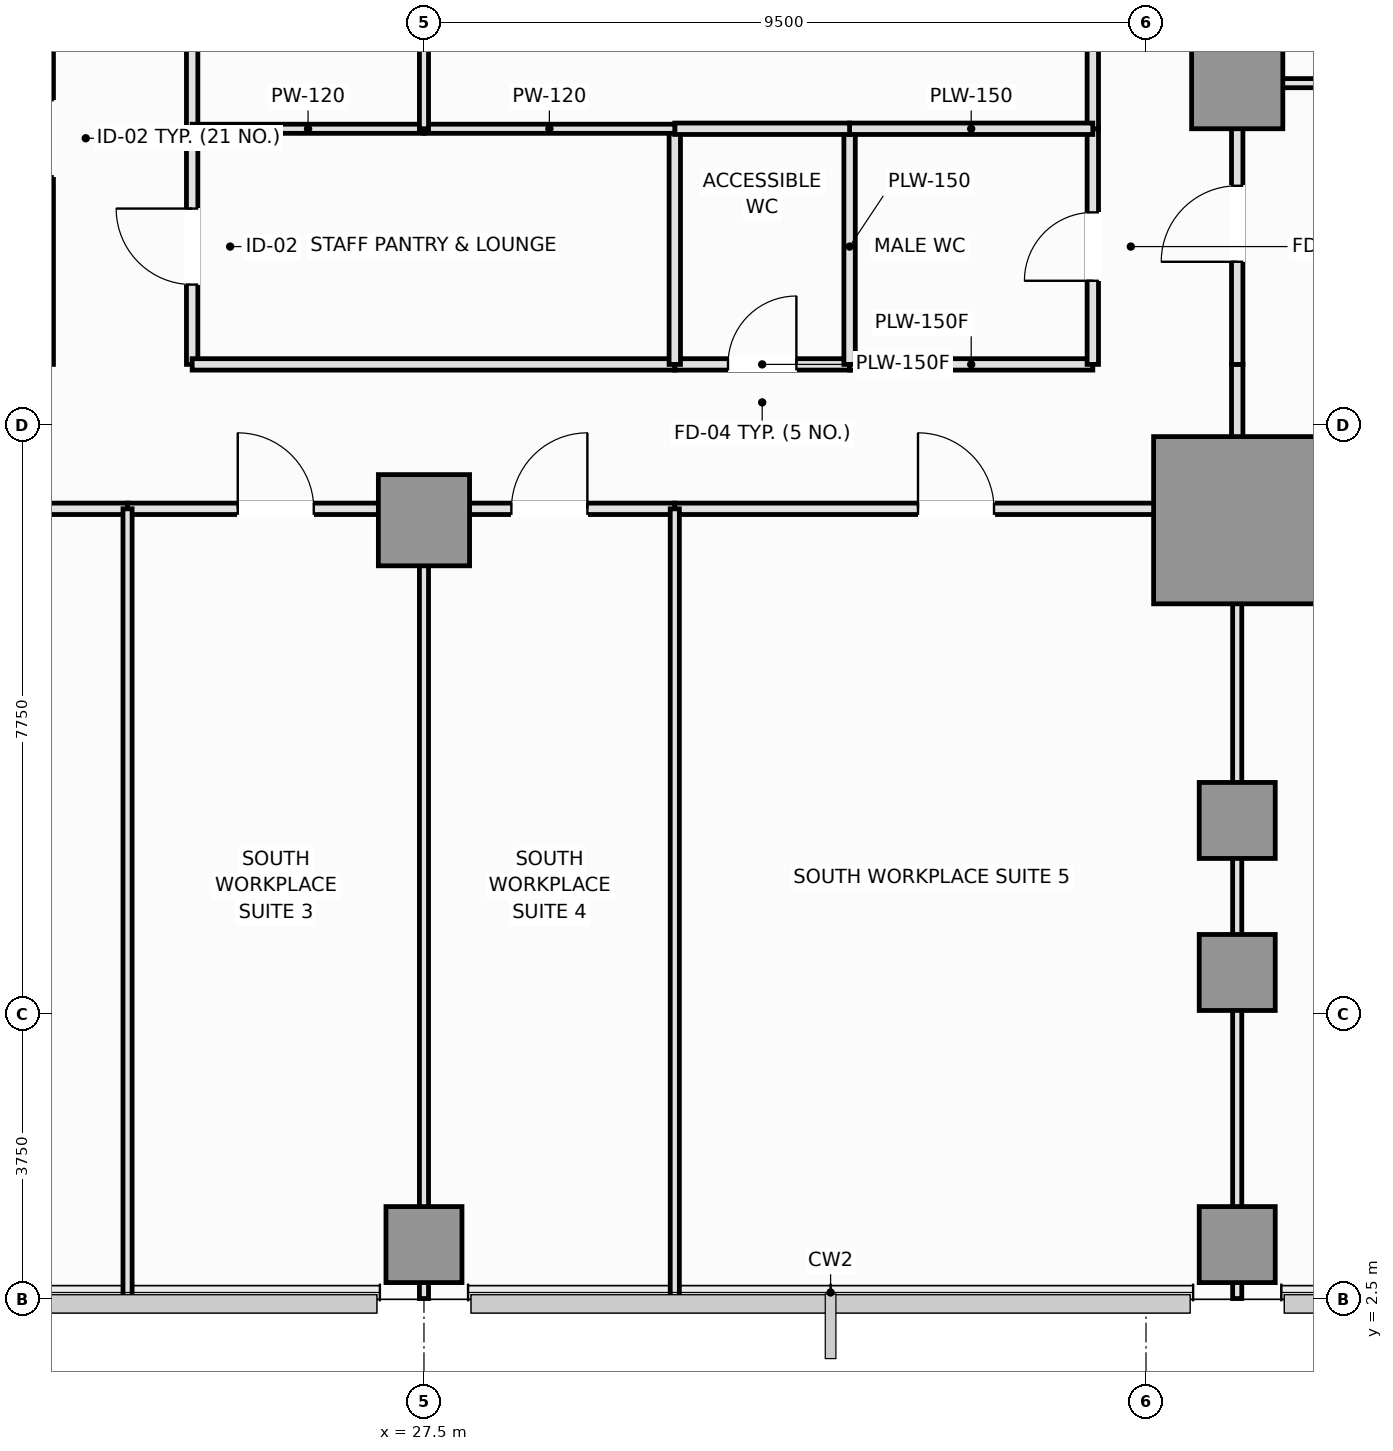
"""IFC4 building model, lengths in metres.
Left out: names, types, materials, properties, quantities, classifications, styles, units other than length and angle.
Written with IfcOpenShell. Run it as: python <this file> out.ifc"""

import sys

from ifc_helpers import new_model, si_unit, direction, frame, frame_2d, origin, origin_2d, place, context, subcontext, project, spatial, rectangle, extrude, element, fill, save


model = new_model("IFC4")
c1 = context("Model", 3, precision=1e-05, world=origin(), true_north=direction((0.0, 1.0)))
c2 = subcontext(c1, "Body", "Model", "MODEL_VIEW")
j1 = project(units=[si_unit("LENGTHUNIT", "METRE"), si_unit("PLANEANGLEUNIT", "RADIAN")], contexts=[c1])
p1 = place(None, origin())
s1 = spatial("IfcSite", under=j1, at=p1, CompositionType="ELEMENT")
p2 = place(p1, origin())
s2 = spatial("IfcBuilding", under=s1, at=p2, CompositionType="ELEMENT")
p3 = place(p2, frame((0.0, 0.0, 82.4)))
s3 = spatial("IfcBuildingStorey", under=s2, at=p3, CompositionType="ELEMENT", Elevation=82.4)
p4 = place(p3, frame((38.2, 12.75, 0.0), z_axis=(0.0, 0.0, 1.0), x_axis=(1.0, 0.0, 0.0)))
e1 = element("IfcColumn", 1, at=p4, inside=s3, PredefinedType="COLUMN", context=c2, shape_type="SweptSolid", body=[
    extrude(rectangle(XDim=2.2, YDim=2.2, at=origin_2d()), origin(), (0.0, 0.0, 1.0), 3.55),
])
for number, where, z_axis, x_axis in (
    (2, (27.5, 12.75, 0.0), (0.0, 0.0, 1.0), (1.0, 0.0, 0.0)),
    (3, (38.2, 18.5, 0.0), (0.0, 0.0, 1.0), (1.0, 0.0, 0.0)),
):
    element("IfcColumn", number, at=place(p3, frame(where, z_axis=z_axis, x_axis=x_axis)), inside=s3, PredefinedType="COLUMN", context=c2, shape_type="SweptSolid", body=[
        extrude(rectangle(XDim=1.2, YDim=1.2, at=origin_2d()), origin(), (0.0, 0.0, 1.0), 3.55),
    ])
for number, where, z_axis, x_axis in (
    (4, (38.2, 6.8, 0.0), (0.0, 0.0, 1.0), (1.0, 0.0, 0.0)),
    (5, (38.2, 8.8, 0.0), (0.0, 0.0, 1.0), (1.0, 0.0, 0.0)),
    (6, (27.5, 3.22, 0.0), (0.0, 0.0, 1.0), (1.0, 0.0, 0.0)),
    (7, (38.2, 3.22, 0.0), (0.0, 0.0, 1.0), (1.0, 0.0, 0.0)),
):
    element("IfcColumn", number, at=place(p3, frame(where, z_axis=z_axis, x_axis=x_axis)), inside=s3, PredefinedType="COLUMN", context=c2, shape_type="SweptSolid", body=[
        extrude(rectangle(XDim=1.0, YDim=1.0, at=origin_2d()), origin(), (0.0, 0.0, 1.0), 3.55),
    ])
p5 = place(p3, frame((22.55, 14.8, 0.0), z_axis=(0.0, 0.0, 1.0), x_axis=(0.0, 1.0, 0.0)))
e8 = element("IfcWall", 8, at=p5, inside=s3, PredefinedType="PARTITIONING", context=c2, shape_type="SweptSolid", body=[
    extrude(rectangle(XDim=5.95, YDim=0.15, at=frame_2d((2.975, 0.0))), origin(), (0.0, 0.0, 1.0), 3.01),
])
p6 = place(p5, frame((2.475, 0.0, 0.0)))
e9 = element("IfcOpeningElement", 9, at=p6, cuts=e8, PredefinedType="OPENING", context=c2, shape_type="SweptSolid", body=[
    extrude(rectangle(XDim=1.0, YDim=2.15, at=frame_2d((0.5, 1.075))), frame((0.0, 0.085, 0.0), z_axis=(0.0, -1.0, 0.0), x_axis=(1.0, 0.0, 0.0)), (0.0, 0.0, 1.0), 0.17),
])
p7 = place(p3, frame((24.45, 14.8, 0.0), z_axis=(0.0, 0.0, 1.0), x_axis=(0.0, 1.0, 0.0)))
e10 = element("IfcWall", 10, at=p7, inside=s3, PredefinedType="PARTITIONING", context=c2, shape_type="SweptSolid", body=[
    extrude(rectangle(XDim=3.1, YDim=0.15, at=frame_2d((1.55, 0.0))), origin(), (0.0, 0.0, 1.0), 3.37),
])
p8 = place(p7, frame((1.05, 0.0, 0.0)))
e11 = element("IfcOpeningElement", 11, at=p8, cuts=e10, PredefinedType="OPENING", context=c2, shape_type="SweptSolid", body=[
    extrude(rectangle(XDim=1.0, YDim=2.15, at=frame_2d((0.5, 1.075))), frame((0.0, 0.085, 0.0), z_axis=(0.0, -1.0, 0.0), x_axis=(1.0, 0.0, 0.0)), (0.0, 0.0, 1.0), 0.17),
])
p9 = place(p3, frame((24.45, 17.9, 0.0), z_axis=(0.0, 0.0, 1.0), x_axis=(0.0, 1.0, 0.0)))
e12 = element("IfcWall", 12, at=p9, inside=s3, PredefinedType="PARTITIONING", context=c2, shape_type="SweptSolid", body=[
    extrude(rectangle(XDim=7.35, YDim=0.15, at=frame_2d((3.675, 0.0))), origin(), (0.0, 0.0, 1.0), 3.37),
])
p10 = place(p9, frame((3.175, 0.0, 0.0)))
e13 = element("IfcOpeningElement", 13, at=p10, cuts=e12, PredefinedType="OPENING", context=c2, shape_type="SweptSolid", body=[
    extrude(rectangle(XDim=1.0, YDim=2.15, at=frame_2d((0.5, 1.075))), frame((0.0, 0.085, 0.0), z_axis=(0.0, -1.0, 0.0), x_axis=(1.0, 0.0, 0.0)), (0.0, 0.0, 1.0), 0.17),
])
p11 = place(p3, frame((33.1, 14.8, 0.0), z_axis=(0.0, 0.0, 1.0), x_axis=(1.0, 0.0, 0.0)))
e14 = element("IfcWall", 14, at=p11, inside=s3, PredefinedType="PLUMBINGWALL", context=c2, shape_type="SweptSolid", body=[
    extrude(rectangle(XDim=3.2, YDim=0.15, at=frame_2d((1.6, 0.0))), origin(), (0.0, 0.0, 1.0), 3.37),
])
p12 = place(p3, frame((30.8, 14.8, 0.0), z_axis=(0.0, 0.0, 1.0), x_axis=(1.0, 0.0, 0.0)))
e15 = element("IfcWall", 15, at=p12, inside=s3, PredefinedType="PLUMBINGWALL", context=c2, shape_type="SweptSolid", body=[
    extrude(rectangle(XDim=2.3, YDim=0.15, at=frame_2d((1.15, 0.0))), origin(), (0.0, 0.0, 1.0), 3.37),
])
p13 = place(p12, frame((0.7, 0.0, 0.0)))
e16 = element("IfcOpeningElement", 16, at=p13, cuts=e15, PredefinedType="OPENING", context=c2, shape_type="SweptSolid", body=[
    extrude(rectangle(XDim=0.9, YDim=2.1, at=frame_2d((0.45, 1.05))), frame((0.0, 0.085, 0.0), z_axis=(0.0, -1.0, 0.0), x_axis=(1.0, 0.0, 0.0)), (0.0, 0.0, 1.0), 0.17),
])
p14 = place(p3, frame((24.45, 14.8, 0.0), z_axis=(0.0, 0.0, 1.0), x_axis=(1.0, 0.0, 0.0)))
e17 = element("IfcWall", 17, at=p14, inside=s3, PredefinedType="PARTITIONING", context=c2, shape_type="SweptSolid", body=[
    extrude(rectangle(XDim=6.35, YDim=0.15, at=frame_2d((3.175, 0.0))), origin(), (0.0, 0.0, 1.0), 3.37),
])
p15 = place(p3, frame((19.9, 12.9, 0.0), z_axis=(0.0, 0.0, 1.0), x_axis=(1.0, 0.0, 0.0)))
e18 = element("IfcWall", 18, at=p15, inside=s3, PredefinedType="PARTITIONING", context=c2, shape_type="SweptSolid", body=[
    extrude(rectangle(XDim=3.7, YDim=0.15, at=frame_2d((1.85, 0.0))), origin(), (0.0, 0.0, 1.0), 2.72),
])
p16 = place(p15, frame((1.35, 0.0, 0.0)))
e19 = element("IfcOpeningElement", 19, at=p16, cuts=e18, PredefinedType="OPENING", context=c2, shape_type="SweptSolid", body=[
    extrude(rectangle(XDim=1.0, YDim=2.15, at=frame_2d((0.5, 1.075))), frame((0.0, 0.085, 0.0), z_axis=(0.0, -1.0, 0.0), x_axis=(1.0, 0.0, 0.0)), (0.0, 0.0, 1.0), 0.17),
])
p17 = place(p3, frame((23.6, 12.9, 0.0), z_axis=(0.0, 0.0, 1.0), x_axis=(1.0, 0.0, 0.0)))
e20 = element("IfcWall", 20, at=p17, inside=s3, PredefinedType="PARTITIONING", context=c2, shape_type="SweptSolid", body=[
    extrude(rectangle(XDim=3.9, YDim=0.15, at=frame_2d((1.95, 0.0))), origin(), (0.0, 0.0, 1.0), 2.72),
])
p18 = place(p17, frame((1.45, 0.0, 0.0)))
e21 = element("IfcOpeningElement", 21, at=p18, cuts=e20, PredefinedType="OPENING", context=c2, shape_type="SweptSolid", body=[
    extrude(rectangle(XDim=1.0, YDim=2.15, at=frame_2d((0.5, 1.075))), frame((0.0, 0.085, 0.0), z_axis=(0.0, -1.0, 0.0), x_axis=(1.0, 0.0, 0.0)), (0.0, 0.0, 1.0), 0.17),
])
p19 = place(p3, frame((27.5, 12.9, 0.0), z_axis=(0.0, 0.0, 1.0), x_axis=(1.0, 0.0, 0.0)))
e22 = element("IfcWall", 22, at=p19, inside=s3, PredefinedType="PARTITIONING", context=c2, shape_type="SweptSolid", body=[
    extrude(rectangle(XDim=3.3, YDim=0.15, at=frame_2d((1.65, 0.0))), origin(), (0.0, 0.0, 1.0), 2.72),
])
p20 = place(p19, frame((1.15, 0.0, 0.0)))
e23 = element("IfcOpeningElement", 23, at=p20, cuts=e22, PredefinedType="OPENING", context=c2, shape_type="SweptSolid", body=[
    extrude(rectangle(XDim=1.0, YDim=2.15, at=frame_2d((0.5, 1.075))), frame((0.0, 0.085, 0.0), z_axis=(0.0, -1.0, 0.0), x_axis=(1.0, 0.0, 0.0)), (0.0, 0.0, 1.0), 0.17),
])
p21 = place(p3, frame((30.8, 12.9, 0.0), z_axis=(0.0, 0.0, 1.0), x_axis=(1.0, 0.0, 0.0)))
e24 = element("IfcWall", 24, at=p21, inside=s3, PredefinedType="PARTITIONING", context=c2, shape_type="SweptSolid", body=[
    extrude(rectangle(XDim=7.4, YDim=0.15, at=frame_2d((3.7, 0.0))), origin(), (0.0, 0.0, 1.0), 2.72),
])
p22 = place(p21, frame((3.2, 0.0, 0.0)))
e25 = element("IfcOpeningElement", 25, at=p22, cuts=e24, PredefinedType="OPENING", context=c2, shape_type="SweptSolid", body=[
    extrude(rectangle(XDim=1.0, YDim=2.15, at=frame_2d((0.5, 1.075))), frame((0.0, 0.085, 0.0), z_axis=(0.0, -1.0, 0.0), x_axis=(1.0, 0.0, 0.0)), (0.0, 0.0, 1.0), 0.17),
])
p23 = place(p3, frame((38.2, 12.9, 0.0), z_axis=(0.0, 0.0, 1.0), x_axis=(0.0, 1.0, 0.0)))
e26 = element("IfcWall", 26, at=p23, inside=s3, PredefinedType="PARTITIONING", context=c2, shape_type="SweptSolid", body=[
    extrude(rectangle(XDim=1.9, YDim=0.15, at=frame_2d((0.95, 0.0))), origin(), (0.0, 0.0, 1.0), 2.82),
])
p24 = place(p3, frame((36.3, 14.8, 0.0), z_axis=(0.0, 0.0, 1.0), x_axis=(0.0, 1.0, 0.0)))
e27 = element("IfcWall", 27, at=p24, inside=s3, PredefinedType="PLUMBINGWALL", context=c2, shape_type="SweptSolid", body=[
    extrude(rectangle(XDim=3.1, YDim=0.15, at=frame_2d((1.55, 0.0))), origin(), (0.0, 0.0, 1.0), 3.37),
])
p25 = place(p24, frame((1.1, 0.0, 0.0)))
e28 = element("IfcOpeningElement", 28, at=p25, cuts=e27, PredefinedType="OPENING", context=c2, shape_type="SweptSolid", body=[
    extrude(rectangle(XDim=0.9, YDim=2.1, at=frame_2d((0.45, 1.05))), frame((0.0, 0.085, 0.0), z_axis=(0.0, -1.0, 0.0), x_axis=(1.0, 0.0, 0.0)), (0.0, 0.0, 1.0), 0.17),
])
p26 = place(p3, frame((36.3, 17.9, 0.0), z_axis=(0.0, 0.0, 1.0), x_axis=(0.0, 1.0, 0.0)))
e29 = element("IfcWall", 29, at=p26, inside=s3, PredefinedType="PARTITIONING", context=c2, shape_type="SweptSolid", body=[
    extrude(rectangle(XDim=7.35, YDim=0.15, at=frame_2d((3.675, 0.0))), origin(), (0.0, 0.0, 1.0), 3.37),
])
p27 = place(p26, frame((3.175, 0.0, 0.0)))
e30 = element("IfcOpeningElement", 30, at=p27, cuts=e29, PredefinedType="OPENING", context=c2, shape_type="SweptSolid", body=[
    extrude(rectangle(XDim=1.0, YDim=2.15, at=frame_2d((0.5, 1.075))), frame((0.0, 0.085, 0.0), z_axis=(0.0, -1.0, 0.0), x_axis=(1.0, 0.0, 0.0)), (0.0, 0.0, 1.0), 0.17),
])
p28 = place(p3, frame((38.2, 14.8, 0.0), z_axis=(0.0, 0.0, 1.0), x_axis=(0.0, 1.0, 0.0)))
e31 = element("IfcWall", 31, at=p28, inside=s3, PredefinedType="PARTITIONING", context=c2, shape_type="SweptSolid", body=[
    extrude(rectangle(XDim=3.7, YDim=0.15, at=frame_2d((1.85, 0.0))), origin(), (0.0, 0.0, 1.0), 2.82),
])
p29 = place(p28, frame((1.35, 0.0, 0.0)))
e32 = element("IfcOpeningElement", 32, at=p29, cuts=e31, PredefinedType="OPENING", context=c2, shape_type="SweptSolid", body=[
    extrude(rectangle(XDim=1.0, YDim=2.15, at=frame_2d((0.5, 1.075))), frame((0.0, 0.085, 0.0), z_axis=(0.0, -1.0, 0.0), x_axis=(1.0, 0.0, 0.0)), (0.0, 0.0, 1.0), 0.17),
])
p30 = place(p3, frame((38.2, 18.5, 0.0), z_axis=(0.0, 0.0, 1.0), x_axis=(0.0, 1.0, 0.0)))
e33 = element("IfcWall", 33, at=p30, inside=s3, PredefinedType="PARTITIONING", context=c2, shape_type="SweptSolid", body=[
    extrude(rectangle(XDim=4.5, YDim=0.15, at=frame_2d((2.25, 0.0))), origin(), (0.0, 0.0, 1.0), 2.82),
])
p31 = place(p30, frame((1.75, 0.0, 0.0)))
e34 = element("IfcOpeningElement", 34, at=p31, cuts=e33, PredefinedType="OPENING", context=c2, shape_type="SweptSolid", body=[
    extrude(rectangle(XDim=1.0, YDim=2.15, at=frame_2d((0.5, 1.075))), frame((0.0, 0.085, 0.0), z_axis=(0.0, -1.0, 0.0), x_axis=(1.0, 0.0, 0.0)), (0.0, 0.0, 1.0), 0.17),
])
p32 = place(p3, frame((33.1, 14.8, 0.0), z_axis=(0.0, 0.0, 1.0), x_axis=(0.0, 1.0, 0.0)))
e35 = element("IfcWall", 35, at=p32, inside=s3, PredefinedType="PLUMBINGWALL", context=c2, shape_type="SweptSolid", body=[
    extrude(rectangle(XDim=3.1, YDim=0.15, at=frame_2d((1.55, 0.0))), origin(), (0.0, 0.0, 1.0), 3.37),
])
p33 = place(p3, frame((33.1, 17.9, 0.0), z_axis=(0.0, 0.0, 1.0), x_axis=(1.0, 0.0, 0.0)))
e36 = element("IfcWall", 36, at=p33, inside=s3, PredefinedType="PLUMBINGWALL", context=c2, shape_type="SweptSolid", body=[
    extrude(rectangle(XDim=3.2, YDim=0.15, at=frame_2d((1.6, 0.0))), origin(), (0.0, 0.0, 1.0), 3.37),
])
p34 = place(p3, frame((30.8, 14.8, 0.0), z_axis=(0.0, 0.0, 1.0), x_axis=(0.0, 1.0, 0.0)))
e37 = element("IfcWall", 37, at=p34, inside=s3, PredefinedType="PLUMBINGWALL", context=c2, shape_type="SweptSolid", body=[
    extrude(rectangle(XDim=3.1, YDim=0.15, at=frame_2d((1.55, 0.0))), origin(), (0.0, 0.0, 1.0), 3.37),
])
p35 = place(p3, frame((30.8, 17.9, 0.0), z_axis=(0.0, 0.0, 1.0), x_axis=(1.0, 0.0, 0.0)))
e38 = element("IfcWall", 38, at=p35, inside=s3, PredefinedType="PLUMBINGWALL", context=c2, shape_type="SweptSolid", body=[
    extrude(rectangle(XDim=2.3, YDim=0.15, at=frame_2d((1.15, 0.0))), origin(), (0.0, 0.0, 1.0), 3.37),
])
p36 = place(p3, frame((24.45, 17.9, 0.0), z_axis=(0.0, 0.0, 1.0), x_axis=(1.0, 0.0, 0.0)))
e39 = element("IfcWall", 39, at=p36, inside=s3, PredefinedType="PARTITIONING", context=c2, shape_type="SweptSolid", body=[
    extrude(rectangle(XDim=3.05, YDim=0.12, at=frame_2d((1.525, 0.0))), origin(), (0.0, 0.0, 1.0), 3.37),
])
p37 = place(p3, frame((27.5, 17.9, 0.0), z_axis=(0.0, 0.0, 1.0), x_axis=(1.0, 0.0, 0.0)))
e40 = element("IfcWall", 40, at=p37, inside=s3, PredefinedType="PARTITIONING", context=c2, shape_type="SweptSolid", body=[
    extrude(rectangle(XDim=3.3, YDim=0.12, at=frame_2d((1.65, 0.0))), origin(), (0.0, 0.0, 1.0), 3.37),
])
p38 = place(p3, frame((27.5, 17.9, 0.0), z_axis=(0.0, 0.0, 1.0), x_axis=(0.0, 1.0, 0.0)))
e41 = element("IfcWall", 41, at=p38, inside=s3, PredefinedType="PARTITIONING", context=c2, shape_type="SweptSolid", body=[
    extrude(rectangle(XDim=7.35, YDim=0.12, at=frame_2d((3.675, 0.0))), origin(), (0.0, 0.0, 1.0), 3.37),
])
p39 = place(p3, frame((23.6, 2.51, 0.0), z_axis=(0.0, 0.0, 1.0), x_axis=(0.0, 1.0, 0.0)))
e42 = element("IfcWall", 42, at=p39, inside=s3, PredefinedType="PARTITIONING", context=c2, shape_type="SweptSolid", body=[
    extrude(rectangle(XDim=10.39, YDim=0.12, at=frame_2d((5.195, 0.0))), origin(), (0.0, 0.0, 1.0), 3.37),
])
p40 = place(p3, frame((27.5, 2.51, 0.0), z_axis=(0.0, 0.0, 1.0), x_axis=(0.0, 1.0, 0.0)))
e43 = element("IfcWall", 43, at=p40, inside=s3, PredefinedType="PARTITIONING", context=c2, shape_type="SweptSolid", body=[
    extrude(rectangle(XDim=10.39, YDim=0.12, at=frame_2d((5.195, 0.0))), origin(), (0.0, 0.0, 1.0), 2.82),
])
p41 = place(p3, frame((30.8, 2.51, 0.0), z_axis=(0.0, 0.0, 1.0), x_axis=(0.0, 1.0, 0.0)))
e44 = element("IfcWall", 44, at=p41, inside=s3, PredefinedType="PARTITIONING", context=c2, shape_type="SweptSolid", body=[
    extrude(rectangle(XDim=10.39, YDim=0.12, at=frame_2d((5.195, 0.0))), origin(), (0.0, 0.0, 1.0), 3.01),
])
p42 = place(p3, frame((38.2, 2.51, 0.0), z_axis=(0.0, 0.0, 1.0), x_axis=(0.0, 1.0, 0.0)))
e45 = element("IfcWall", 45, at=p42, inside=s3, PredefinedType="PARTITIONING", context=c2, shape_type="SweptSolid", body=[
    extrude(rectangle(XDim=10.39, YDim=0.12, at=frame_2d((5.195, 0.0))), origin(), (0.0, 0.0, 1.0), 2.82),
])
p43 = place(p3, frame((38.2, 18.5, 0.0), z_axis=(0.0, 0.0, 1.0), x_axis=(1.0, 0.0, 0.0)))
e46 = element("IfcWall", 46, at=p43, inside=s3, PredefinedType="PARTITIONING", context=c2, shape_type="SweptSolid", body=[
    extrude(rectangle(XDim=15.29, YDim=0.12, at=frame_2d((7.645, 0.0))), origin(), (0.0, 0.0, 1.0), 2.72),
])
p44 = place(p8, origin())
e47 = element("IfcDoor", 47, at=p44, inside=s3, OperationType="SINGLE_SWING_RIGHT", PredefinedType="DOOR", context=c2, shape_type="SweptSolid", body=[
    extrude(rectangle(XDim=1.0, YDim=2.15, at=frame_2d((0.5, 1.075))), frame((0.0, 0.025, 0.0), z_axis=(0.0, -1.0, 0.0), x_axis=(1.0, 0.0, 0.0)), (0.0, 0.0, 1.0), 0.05),
])
fill(e11, e47)
p45 = place(p13, origin())
e48 = element("IfcDoor", 48, at=p45, inside=s3, OperationType="SINGLE_SWING_RIGHT", PredefinedType="DOOR", context=c2, shape_type="SweptSolid", body=[
    extrude(rectangle(XDim=0.9, YDim=2.1, at=frame_2d((0.45, 1.05))), frame((0.0, 0.025, 0.0), z_axis=(0.0, -1.0, 0.0), x_axis=(1.0, 0.0, 0.0)), (0.0, 0.0, 1.0), 0.05),
])
fill(e16, e48)
p46 = place(p18, origin())
e49 = element("IfcDoor", 49, at=p46, inside=s3, OperationType="SINGLE_SWING_LEFT", PredefinedType="DOOR", context=c2, shape_type="SweptSolid", body=[
    extrude(rectangle(XDim=1.0, YDim=2.15, at=frame_2d((0.5, 1.075))), frame((0.0, 0.025, 0.0), z_axis=(0.0, -1.0, 0.0), x_axis=(1.0, 0.0, 0.0)), (0.0, 0.0, 1.0), 0.05),
])
fill(e21, e49)
p47 = place(p20, origin())
e50 = element("IfcDoor", 50, at=p47, inside=s3, OperationType="SINGLE_SWING_RIGHT", PredefinedType="DOOR", context=c2, shape_type="SweptSolid", body=[
    extrude(rectangle(XDim=1.0, YDim=2.15, at=frame_2d((0.5, 1.075))), frame((0.0, 0.025, 0.0), z_axis=(0.0, -1.0, 0.0), x_axis=(1.0, 0.0, 0.0)), (0.0, 0.0, 1.0), 0.05),
])
fill(e23, e50)
p48 = place(p22, origin())
e51 = element("IfcDoor", 51, at=p48, inside=s3, OperationType="SINGLE_SWING_LEFT", PredefinedType="DOOR", context=c2, shape_type="SweptSolid", body=[
    extrude(rectangle(XDim=1.0, YDim=2.15, at=frame_2d((0.5, 1.075))), frame((0.0, 0.025, 0.0), z_axis=(0.0, -1.0, 0.0), x_axis=(1.0, 0.0, 0.0)), (0.0, 0.0, 1.0), 0.05),
])
fill(e25, e51)
p49 = place(p25, origin())
e52 = element("IfcDoor", 52, at=p49, inside=s3, OperationType="SINGLE_SWING_LEFT", PredefinedType="DOOR", context=c2, shape_type="SweptSolid", body=[
    extrude(rectangle(XDim=0.9, YDim=2.1, at=frame_2d((0.45, 1.05))), frame((0.0, 0.025, 0.0), z_axis=(0.0, -1.0, 0.0), x_axis=(1.0, 0.0, 0.0)), (0.0, 0.0, 1.0), 0.05),
])
fill(e28, e52)
p50 = place(p29, origin())
e53 = element("IfcDoor", 53, at=p50, inside=s3, OperationType="SINGLE_SWING_LEFT", PredefinedType="DOOR", context=c2, shape_type="SweptSolid", body=[
    extrude(rectangle(XDim=1.0, YDim=2.15, at=frame_2d((0.5, 1.075))), frame((0.0, 0.025, 0.0), z_axis=(0.0, -1.0, 0.0), x_axis=(1.0, 0.0, 0.0)), (0.0, 0.0, 1.0), 0.05),
])
fill(e32, e53)
save(model, sys.argv[1])
